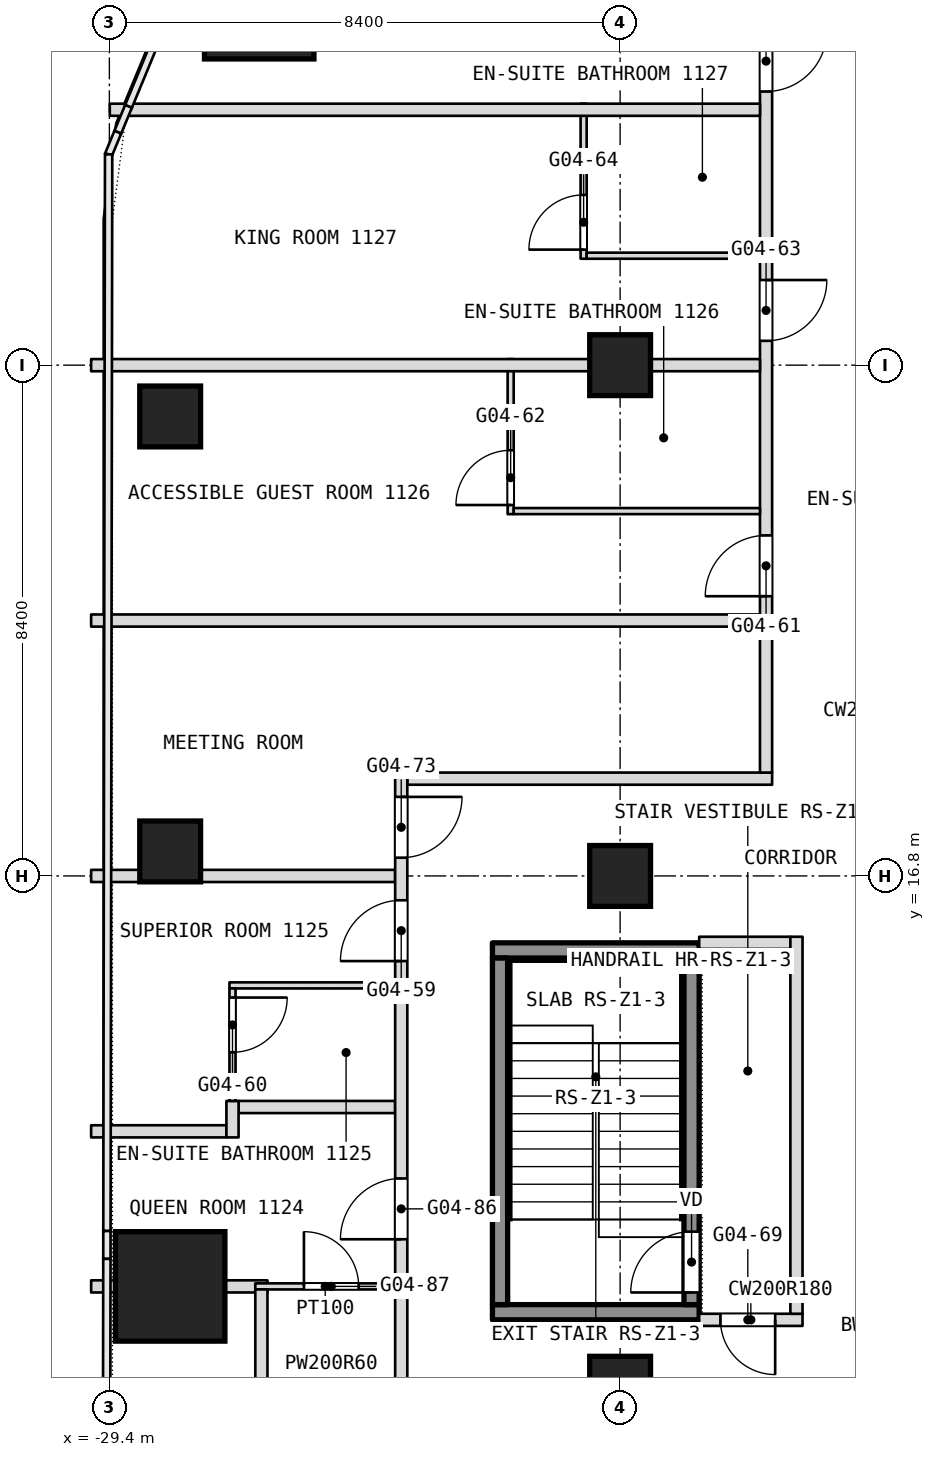
"""IFC4 building model, lengths in metres.
Left out: names, types, materials, properties, quantities, classifications, styles, units other than length and angle.
Written with IfcOpenShell. Run it as: python <this file> out.ifc"""

import sys

from ifc_helpers import new_model, si_unit, direction, frame, frame_2d, origin, origin_2d, place, context, subcontext, project, spatial, rectangle, extrude, element, fill, save


model = new_model("IFC4")
c1 = context("Model", 3, precision=1e-05, world=origin(), true_north=direction((0.0, 1.0)))
c2 = subcontext(c1, "Body", "Model", "MODEL_VIEW")
j1 = project(units=[si_unit("LENGTHUNIT", "METRE"), si_unit("PLANEANGLEUNIT", "RADIAN")], contexts=[c1])
p1 = place(None, origin())
s1 = spatial("IfcSite", under=j1, at=p1, CompositionType="ELEMENT")
p2 = place(p1, origin())
s2 = spatial("IfcBuilding", under=s1, at=p2, CompositionType="ELEMENT")
p3 = place(p2, frame((0.0, 0.0, 54.5)))
s3 = spatial("IfcBuildingStorey", under=s2, at=p3, CompositionType="ELEMENT", Elevation=54.5)
for number, where, z_axis, x_axis in (
    (1, (-26.936, 31.135, 0.0), (0.0, 0.0, 1.0), (1.0, 0.0, 0.0)),
    (2, (-28.4, 10.05, 0.0), (0.0, 0.0, 1.0), (1.0, 0.0, 0.0)),
):
    element("IfcColumn", number, at=place(p3, frame(where, z_axis=z_axis, x_axis=x_axis)), inside=s3, PredefinedType="COLUMN", context=c2, shape_type="SweptSolid", body=[
        extrude(rectangle(XDim=1.8, YDim=1.8, at=origin_2d()), origin(), (0.0, 0.0, 1.0), 3.6),
    ])
for number, where, z_axis, x_axis in (
    (3, (-21.0, 8.4, 0.0), (0.0, 0.0, 1.0), (1.0, 0.0, 0.0)),
    (4, (-21.0, 16.8, 0.0), (0.0, 0.0, 1.0), (1.0, 0.0, 0.0)),
    (5, (-21.0, 25.2, 0.0), (0.0, 0.0, 1.0), (1.0, 0.0, 0.0)),
    (6, (-28.4, 17.203, 0.0), (0.0, 0.0, 1.0), (1.0, 0.0, 0.0)),
    (7, (-28.4, 24.356, 0.0), (0.0, 0.0, 1.0), (1.0, 0.0, 0.0)),
):
    element("IfcColumn", number, at=place(p3, frame(where, z_axis=z_axis, x_axis=x_axis)), inside=s3, PredefinedType="COLUMN", context=c2, shape_type="SweptSolid", body=[
        extrude(rectangle(XDim=1.0, YDim=1.0, at=origin_2d()), origin(), (0.0, 0.0, 1.0), 3.6),
    ])
p4 = place(p3, frame((-19.7, 9.5, 0.0), z_axis=(0.0, 0.0, 1.0), x_axis=(1.0, 0.0, 0.0)))
e8 = element("IfcWall", 8, at=p4, inside=s3, PredefinedType="PARTITIONING", context=c2, shape_type="SweptSolid", body=[
    extrude(rectangle(XDim=1.7, YDim=0.2, at=frame_2d((0.85, 0.0))), origin(), (0.0, 0.0, 1.0), 3.34),
])
p5 = place(p4, frame((0.35, 0.0, 0.0)))
e9 = element("IfcOpeningElement", 9, at=p5, cuts=e8, PredefinedType="OPENING", context=c2, shape_type="SweptSolid", body=[
    extrude(rectangle(XDim=0.9, YDim=2.1, at=frame_2d((0.45, 1.05))), frame((0.0, 0.1, 0.0), z_axis=(0.0, -1.0, 0.0), x_axis=(1.0, 0.0, 0.0)), (0.0, 0.0, 1.0), 0.2),
])
p6 = place(p3, frame((-29.7, 10.05, 0.0), z_axis=(0.0, 0.0, 1.0), x_axis=(1.0, 0.0, 0.0)))
e10 = element("IfcWall", 10, at=p6, inside=s3, PredefinedType="PARTITIONING", context=c2, shape_type="SweptSolid", body=[
    extrude(rectangle(XDim=0.4, YDim=0.2, at=frame_2d((0.2, 0.0))), origin(), (0.0, 0.0, 1.0), 3.34),
])
p7 = place(p3, frame((-27.5, 10.05, 0.0), z_axis=(0.0, 0.0, 1.0), x_axis=(1.0, 0.0, 0.0)))
e11 = element("IfcWall", 11, at=p7, inside=s3, PredefinedType="PARTITIONING", context=c2, shape_type="SweptSolid", body=[
    extrude(rectangle(XDim=0.7, YDim=0.2, at=frame_2d((0.35, 0.0))), origin(), (0.0, 0.0, 1.0), 3.34),
])
p8 = place(p3, frame((-27.0, 10.05, 0.0), z_axis=(0.0, 0.0, 1.0), x_axis=(1.0, 0.0, 0.0)))
e12 = element("IfcWall", 12, at=p8, inside=s3, PredefinedType="PARTITIONING", context=c2, shape_type="SweptSolid", body=[
    extrude(rectangle(XDim=2.3, YDim=0.1, at=frame_2d((1.15, 0.0))), origin(), (0.0, 0.0, 1.0), 3.34),
])
p9 = place(p8, frame((0.8, 0.0, 0.0)))
e13 = element("IfcOpeningElement", 13, at=p9, cuts=e12, PredefinedType="OPENING", context=c2, shape_type="SweptSolid", body=[
    extrude(rectangle(XDim=0.9, YDim=2.1, at=frame_2d((0.45, 1.05))), frame((0.0, 0.05, 0.0), z_axis=(0.0, -1.0, 0.0), x_axis=(1.0, 0.0, 0.0)), (0.0, 0.0, 1.0), 0.1),
])
p10 = place(p3, frame((-29.7, 12.6, 0.0), z_axis=(0.0, 0.0, 1.0), x_axis=(1.0, 0.0, 0.0)))
e14 = element("IfcWall", 14, at=p10, inside=s3, PredefinedType="PARTITIONING", context=c2, shape_type="SweptSolid", body=[
    extrude(rectangle(XDim=2.225, YDim=0.2, at=frame_2d((1.112, 0.0))), origin(), (0.0, 0.0, 1.0), 3.34),
])
p11 = place(p3, frame((-27.275, 13.0, 0.0), z_axis=(0.0, 0.0, 1.0), x_axis=(1.0, 0.0, 0.0)))
e15 = element("IfcWall", 15, at=p11, inside=s3, PredefinedType="PARTITIONING", context=c2, shape_type="SweptSolid", body=[
    extrude(rectangle(XDim=2.575, YDim=0.2, at=frame_2d((1.288, 0.0))), origin(), (0.0, 0.0, 1.0), 3.34),
])
p12 = place(p3, frame((-27.425, 15.0, 0.0), z_axis=(0.0, 0.0, 1.0), x_axis=(1.0, 0.0, 0.0)))
e16 = element("IfcWall", 16, at=p12, inside=s3, PredefinedType="PARTITIONING", context=c2, shape_type="SweptSolid", body=[
    extrude(rectangle(XDim=2.725, YDim=0.1, at=frame_2d((1.363, 0.0))), origin(), (0.0, 0.0, 1.0), 3.34),
])
p13 = place(p3, frame((-19.7, 15.7, 0.0), z_axis=(0.0, 0.0, 1.0), x_axis=(1.0, 0.0, 0.0)))
e17 = element("IfcWall", 17, at=p13, inside=s3, PredefinedType="PARTITIONING", context=c2, shape_type="SweptSolid", body=[
    extrude(rectangle(XDim=1.5, YDim=0.2, at=frame_2d((0.75, 0.0))), origin(), (0.0, 0.0, 1.0), 3.34),
])
p14 = place(p3, frame((-29.7, 16.8, 0.0), z_axis=(0.0, 0.0, 1.0), x_axis=(1.0, 0.0, 0.0)))
e18 = element("IfcWall", 18, at=p14, inside=s3, PredefinedType="PARTITIONING", context=c2, shape_type="SweptSolid", body=[
    extrude(rectangle(XDim=5.0, YDim=0.2, at=frame_2d((2.5, 0.0))), origin(), (0.0, 0.0, 1.0), 2.84),
])
p15 = place(p3, frame((-18.1, 9.6, 0.0), z_axis=(0.0, 0.0, 1.0), x_axis=(0.0, 1.0, 0.0)))
e19 = element("IfcWall", 19, at=p15, inside=s3, PredefinedType="PARTITIONING", context=c2, shape_type="SweptSolid", body=[
    extrude(rectangle(XDim=6.2, YDim=0.2, at=frame_2d((3.1, 0.0))), origin(), (0.0, 0.0, 1.0), 3.34),
])
p16 = place(p3, frame((-24.5, 18.4, 0.0), z_axis=(0.0, 0.0, 1.0), x_axis=(1.0, 0.0, 0.0)))
e20 = element("IfcWall", 20, at=p16, inside=s3, PredefinedType="PARTITIONING", context=c2, shape_type="SweptSolid", body=[
    extrude(rectangle(XDim=6.0, YDim=0.2, at=frame_2d((3.0, 0.0))), origin(), (0.0, 0.0, 1.0), 3.34),
])
p17 = place(p3, frame((-18.6, 18.5, 0.0), z_axis=(0.0, 0.0, 1.0), x_axis=(0.0, 1.0, 0.0)))
e21 = element("IfcWall", 21, at=p17, inside=s3, PredefinedType="PARTITIONING", context=c2, shape_type="SweptSolid", body=[
    extrude(rectangle(XDim=15.04, YDim=0.2, at=frame_2d((7.52, 0.0))), origin(), (0.0, 0.0, 1.0), 3.34),
])
p18 = place(p17, frame((2.9, 0.0, 0.0)))
e22 = element("IfcOpeningElement", 22, at=p18, cuts=e21, PredefinedType="OPENING", context=c2, shape_type="SweptSolid", body=[
    extrude(rectangle(XDim=1.0, YDim=2.1, at=frame_2d((0.5, 1.05))), frame((0.0, 0.1, 0.0), z_axis=(0.0, -1.0, 0.0), x_axis=(1.0, 0.0, 0.0)), (0.0, 0.0, 1.0), 0.2),
])
p19 = place(p17, frame((7.1, 0.0, 0.0)))
e23 = element("IfcOpeningElement", 23, at=p19, cuts=e21, PredefinedType="OPENING", context=c2, shape_type="SweptSolid", body=[
    extrude(rectangle(XDim=1.0, YDim=2.1, at=frame_2d((0.5, 1.05))), frame((0.0, 0.1, 0.0), z_axis=(0.0, -1.0, 0.0), x_axis=(1.0, 0.0, 0.0)), (0.0, 0.0, 1.0), 0.2),
])
p20 = place(p17, frame((11.2, 0.0, 0.0)))
e24 = element("IfcOpeningElement", 24, at=p20, cuts=e21, PredefinedType="OPENING", context=c2, shape_type="SweptSolid", body=[
    extrude(rectangle(XDim=1.0, YDim=2.1, at=frame_2d((0.5, 1.05))), frame((0.0, 0.1, 0.0), z_axis=(0.0, -1.0, 0.0), x_axis=(1.0, 0.0, 0.0)), (0.0, 0.0, 1.0), 0.2),
])
p21 = place(p3, frame((-29.7, 21.0, 0.0), z_axis=(0.0, 0.0, 1.0), x_axis=(1.0, 0.0, 0.0)))
e25 = element("IfcWall", 25, at=p21, inside=s3, PredefinedType="PARTITIONING", context=c2, shape_type="SweptSolid", body=[
    extrude(rectangle(XDim=11.0, YDim=0.2, at=frame_2d((5.5, 0.0))), origin(), (0.0, 0.0, 1.0), 3.34),
])
p22 = place(p3, frame((-21.6, 26.95, 0.0), z_axis=(0.0, 0.0, 1.0), x_axis=(0.0, 1.0, 0.0)))
e26 = element("IfcWall", 26, at=p22, inside=s3, PredefinedType="PARTITIONING", context=c2, shape_type="SweptSolid", body=[
    extrude(rectangle(XDim=2.55, YDim=0.1, at=frame_2d((1.275, 0.0))), origin(), (0.0, 0.0, 1.0), 3.34),
])
p23 = place(p22, frame((0.15, 0.0, 0.0)))
e27 = element("IfcOpeningElement", 27, at=p23, cuts=e26, PredefinedType="OPENING", context=c2, shape_type="SweptSolid", body=[
    extrude(rectangle(XDim=0.9, YDim=2.1, at=frame_2d((0.45, 1.05))), frame((0.0, 0.05, 0.0), z_axis=(0.0, -1.0, 0.0), x_axis=(1.0, 0.0, 0.0)), (0.0, 0.0, 1.0), 0.1),
])
p24 = place(p3, frame((-22.8, 22.75, 0.0), z_axis=(0.0, 0.0, 1.0), x_axis=(0.0, 1.0, 0.0)))
e28 = element("IfcWall", 28, at=p24, inside=s3, PredefinedType="PARTITIONING", context=c2, shape_type="SweptSolid", body=[
    extrude(rectangle(XDim=2.55, YDim=0.1, at=frame_2d((1.275, 0.0))), origin(), (0.0, 0.0, 1.0), 3.34),
])
p25 = place(p24, frame((0.15, 0.0, 0.0)))
e29 = element("IfcOpeningElement", 29, at=p25, cuts=e28, PredefinedType="OPENING", context=c2, shape_type="SweptSolid", body=[
    extrude(rectangle(XDim=0.9, YDim=2.1, at=frame_2d((0.45, 1.05))), frame((0.0, 0.05, 0.0), z_axis=(0.0, -1.0, 0.0), x_axis=(1.0, 0.0, 0.0)), (0.0, 0.0, 1.0), 0.1),
])
p26 = place(p3, frame((-22.75, 22.8, 0.0), z_axis=(0.0, 0.0, 1.0), x_axis=(1.0, 0.0, 0.0)))
e30 = element("IfcWall", 30, at=p26, inside=s3, PredefinedType="PARTITIONING", context=c2, shape_type="SweptSolid", body=[
    extrude(rectangle(XDim=4.05, YDim=0.1, at=frame_2d((2.025, 0.0))), origin(), (0.0, 0.0, 1.0), 3.34),
])
p27 = place(p3, frame((-24.6, 6.9, 0.0), z_axis=(0.0, 0.0, 1.0), x_axis=(0.0, 1.0, 0.0)))
e31 = element("IfcWall", 31, at=p27, inside=s3, PredefinedType="PARTITIONING", context=c2, shape_type="SweptSolid", body=[
    extrude(rectangle(XDim=11.6, YDim=0.2, at=frame_2d((5.8, 0.0))), origin(), (0.0, 0.0, 1.0), 3.34),
])
p28 = place(p27, frame((8.5, 0.0, 0.0)))
e32 = element("IfcOpeningElement", 32, at=p28, cuts=e31, PredefinedType="OPENING", context=c2, shape_type="SweptSolid", body=[
    extrude(rectangle(XDim=1.0, YDim=2.1, at=frame_2d((0.5, 1.05))), frame((0.0, 0.1, 0.0), z_axis=(0.0, -1.0, 0.0), x_axis=(1.0, 0.0, 0.0)), (0.0, 0.0, 1.0), 0.2),
])
p29 = place(p27, frame((10.2, 0.0, 0.0)))
e33 = element("IfcOpeningElement", 33, at=p29, cuts=e31, PredefinedType="OPENING", context=c2, shape_type="SweptSolid", body=[
    extrude(rectangle(XDim=1.0, YDim=2.1, at=frame_2d((0.5, 1.05))), frame((0.0, 0.1, 0.0), z_axis=(0.0, -1.0, 0.0), x_axis=(1.0, 0.0, 0.0)), (0.0, 0.0, 1.0), 0.2),
])
p30 = place(p27, frame((0.3, 0.0, 0.0)))
e34 = element("IfcOpeningElement", 34, at=p30, cuts=e31, PredefinedType="OPENING", context=c2, shape_type="SweptSolid", body=[
    extrude(rectangle(XDim=1.0, YDim=2.1, at=frame_2d((0.5, 1.05))), frame((0.0, 0.1, 0.0), z_axis=(0.0, -1.0, 0.0), x_axis=(1.0, 0.0, 0.0)), (0.0, 0.0, 1.0), 0.2),
])
p31 = place(p27, frame((3.925, 0.0, 0.0)))
e35 = element("IfcOpeningElement", 35, at=p31, cuts=e31, PredefinedType="OPENING", context=c2, shape_type="SweptSolid", body=[
    extrude(rectangle(XDim=1.0, YDim=2.1, at=frame_2d((0.5, 1.05))), frame((0.0, 0.1, 0.0), z_axis=(0.0, -1.0, 0.0), x_axis=(1.0, 0.0, 0.0)), (0.0, 0.0, 1.0), 0.2),
])
p32 = place(p3, frame((-29.7, 25.2, 0.0), z_axis=(0.0, 0.0, 1.0), x_axis=(1.0, 0.0, 0.0)))
e36 = element("IfcWall", 36, at=p32, inside=s3, PredefinedType="PARTITIONING", context=c2, shape_type="SweptSolid", body=[
    extrude(rectangle(XDim=11.0, YDim=0.2, at=frame_2d((5.5, 0.0))), origin(), (0.0, 0.0, 1.0), 2.84),
])
p33 = place(p3, frame((-26.9, 8.3, 0.0), z_axis=(0.0, 0.0, 1.0), x_axis=(0.0, 1.0, 0.0)))
e37 = element("IfcWall", 37, at=p33, inside=s3, PredefinedType="PARTITIONING", context=c2, shape_type="SweptSolid", body=[
    extrude(rectangle(XDim=1.7, YDim=0.2, at=frame_2d((0.85, 0.0))), origin(), (0.0, 0.0, 1.0), 3.34),
])
p34 = place(p3, frame((-21.55, 27.0, 0.0), z_axis=(0.0, 0.0, 1.0), x_axis=(1.0, 0.0, 0.0)))
e38 = element("IfcWall", 38, at=p34, inside=s3, PredefinedType="PARTITIONING", context=c2, shape_type="SweptSolid", body=[
    extrude(rectangle(XDim=2.85, YDim=0.1, at=frame_2d((1.425, 0.0))), origin(), (0.0, 0.0, 1.0), 3.34),
])
p35 = place(p3, frame((-27.375, 12.5, 0.0), z_axis=(0.0, 0.0, 1.0), x_axis=(0.0, 1.0, 0.0)))
e39 = element("IfcWall", 39, at=p35, inside=s3, PredefinedType="PARTITIONING", context=c2, shape_type="SweptSolid", body=[
    extrude(rectangle(XDim=0.6, YDim=0.2, at=frame_2d((0.3, 0.0))), origin(), (0.0, 0.0, 1.0), 3.34),
])
p36 = place(p3, frame((-27.375, 13.1, 0.0), z_axis=(0.0, 0.0, 1.0), x_axis=(0.0, 1.0, 0.0)))
e40 = element("IfcWall", 40, at=p36, inside=s3, PredefinedType="PARTITIONING", context=c2, shape_type="SweptSolid", body=[
    extrude(rectangle(XDim=1.85, YDim=0.1, at=frame_2d((0.925, 0.0))), origin(), (0.0, 0.0, 1.0), 3.34),
])
p37 = place(p36, frame((0.8, 0.0, 0.0)))
e41 = element("IfcOpeningElement", 41, at=p37, cuts=e40, PredefinedType="OPENING", context=c2, shape_type="SweptSolid", body=[
    extrude(rectangle(XDim=0.9, YDim=2.1, at=frame_2d((0.45, 1.05))), frame((0.0, 0.05, 0.0), z_axis=(0.0, -1.0, 0.0), x_axis=(1.0, 0.0, 0.0)), (0.0, 0.0, 1.0), 0.1),
])
p38 = place(p3, frame((-29.393, 29.4, 0.0), z_axis=(0.0, 0.0, 1.0), x_axis=(1.0, 0.0, 0.0)))
e42 = element("IfcWall", 42, at=p38, inside=s3, PredefinedType="PARTITIONING", context=c2, shape_type="SweptSolid", body=[
    extrude(rectangle(XDim=10.693, YDim=0.2, at=frame_2d((5.347, 0.0))), origin(), (0.0, 0.0, 1.0), 3.34),
])
for number, where, z_axis, x_axis in (
    (43, (-23.1, 9.625, 0.1), (0.0, 0.0, 1.0), (1.0, 0.0, 0.0)),
    (44, (-23.1, 15.575, 0.1), (0.0, 0.0, 1.0), (1.0, 0.0, 0.0)),
):
    element("IfcWall", number, at=place(p3, frame(where, z_axis=z_axis, x_axis=x_axis)), inside=s3, PredefinedType="SHEAR", context=c2, shape_type="SweptSolid", body=[
        extrude(rectangle(XDim=3.4, YDim=0.25, at=frame_2d((1.7, 0.0))), origin(), (0.0, 0.0, 1.0), 3.6),
    ])
p39 = place(p3, frame((-22.975, 9.75, 0.1), z_axis=(0.0, 0.0, 1.0), x_axis=(0.0, 1.0, 0.0)))
e45 = element("IfcWall", 45, at=p39, inside=s3, PredefinedType="SHEAR", context=c2, shape_type="SweptSolid", body=[
    extrude(rectangle(XDim=5.7, YDim=0.25, at=frame_2d((2.85, 0.0))), origin(), (0.0, 0.0, 1.0), 3.6),
])
p40 = place(p3, frame((-19.825, 9.75, 0.1), z_axis=(0.0, 0.0, 1.0), x_axis=(0.0, 1.0, 0.0)))
e46 = element("IfcWall", 46, at=p40, inside=s3, PredefinedType="SHEAR", context=c2, shape_type="SweptSolid", body=[
    extrude(rectangle(XDim=5.7, YDim=0.25, at=frame_2d((2.85, 0.0))), origin(), (0.0, 0.0, 1.0), 3.6),
])
p41 = place(p40, frame((0.2, 0.0, 0.0)))
e47 = element("IfcOpeningElement", 47, at=p41, cuts=e46, PredefinedType="OPENING", context=c2, shape_type="SweptSolid", body=[
    extrude(rectangle(XDim=1.0, YDim=2.1, at=frame_2d((0.5, 1.05))), frame((0.0, 0.125, 0.0), z_axis=(0.0, -1.0, 0.0), x_axis=(1.0, 0.0, 0.0)), (0.0, 0.0, 1.0), 0.25),
])
p42 = place(p5, origin())
e48 = element("IfcDoor", 48, at=p42, inside=s3, OperationType="SINGLE_SWING_RIGHT", PredefinedType="DOOR", context=c2, shape_type="SweptSolid", body=[
    extrude(rectangle(XDim=0.9, YDim=2.1, at=frame_2d((0.45, 1.05))), frame((0.0, 0.025, 0.0), z_axis=(0.0, -1.0, 0.0), x_axis=(1.0, 0.0, 0.0)), (0.0, 0.0, 1.0), 0.05),
])
fill(e9, e48)
p43 = place(p9, origin())
e49 = element("IfcDoor", 49, at=p43, inside=s3, OperationType="SINGLE_SWING_LEFT", PredefinedType="DOOR", context=c2, shape_type="SweptSolid", body=[
    extrude(rectangle(XDim=0.9, YDim=2.1, at=frame_2d((0.45, 1.05))), frame((0.0, 0.025, 0.0), z_axis=(0.0, -1.0, 0.0), x_axis=(1.0, 0.0, 0.0)), (0.0, 0.0, 1.0), 0.05),
])
fill(e13, e49)
p44 = place(p18, origin())
e50 = element("IfcDoor", 50, at=p44, inside=s3, OperationType="SINGLE_SWING_RIGHT", PredefinedType="DOOR", context=c2, shape_type="SweptSolid", body=[
    extrude(rectangle(XDim=1.0, YDim=2.1, at=frame_2d((0.5, 1.05))), frame((0.0, 0.025, 0.0), z_axis=(0.0, -1.0, 0.0), x_axis=(1.0, 0.0, 0.0)), (0.0, 0.0, 1.0), 0.05),
])
fill(e22, e50)
p45 = place(p19, origin())
e51 = element("IfcDoor", 51, at=p45, inside=s3, OperationType="SINGLE_SWING_RIGHT", PredefinedType="DOOR", context=c2, shape_type="SweptSolid", body=[
    extrude(rectangle(XDim=1.0, YDim=2.1, at=frame_2d((0.5, 1.05))), frame((0.0, 0.025, 0.0), z_axis=(0.0, -1.0, 0.0), x_axis=(1.0, 0.0, 0.0)), (0.0, 0.0, 1.0), 0.05),
])
fill(e23, e51)
p46 = place(p20, origin())
e52 = element("IfcDoor", 52, at=p46, inside=s3, OperationType="SINGLE_SWING_RIGHT", PredefinedType="DOOR", context=c2, shape_type="SweptSolid", body=[
    extrude(rectangle(XDim=1.0, YDim=2.1, at=frame_2d((0.5, 1.05))), frame((0.0, 0.025, 0.0), z_axis=(0.0, -1.0, 0.0), x_axis=(1.0, 0.0, 0.0)), (0.0, 0.0, 1.0), 0.05),
])
fill(e24, e52)
p47 = place(p23, origin())
e53 = element("IfcDoor", 53, at=p47, inside=s3, OperationType="SINGLE_SWING_RIGHT", PredefinedType="DOOR", context=c2, shape_type="SweptSolid", body=[
    extrude(rectangle(XDim=0.9, YDim=2.1, at=frame_2d((0.45, 1.05))), frame((0.0, 0.025, 0.0), z_axis=(0.0, -1.0, 0.0), x_axis=(1.0, 0.0, 0.0)), (0.0, 0.0, 1.0), 0.05),
])
fill(e27, e53)
p48 = place(p25, origin())
e54 = element("IfcDoor", 54, at=p48, inside=s3, OperationType="SINGLE_SWING_RIGHT", PredefinedType="DOOR", context=c2, shape_type="SweptSolid", body=[
    extrude(rectangle(XDim=0.9, YDim=2.1, at=frame_2d((0.45, 1.05))), frame((0.0, 0.025, 0.0), z_axis=(0.0, -1.0, 0.0), x_axis=(1.0, 0.0, 0.0)), (0.0, 0.0, 1.0), 0.05),
])
fill(e29, e54)
p49 = place(p28, origin())
e55 = element("IfcDoor", 55, at=p49, inside=s3, OperationType="SINGLE_SWING_RIGHT", PredefinedType="DOOR", context=c2, shape_type="SweptSolid", body=[
    extrude(rectangle(XDim=1.0, YDim=2.1, at=frame_2d((0.5, 1.05))), frame((0.0, 0.025, 0.0), z_axis=(0.0, -1.0, 0.0), x_axis=(1.0, 0.0, 0.0)), (0.0, 0.0, 1.0), 0.05),
])
fill(e32, e55)
p50 = place(p29, origin())
e56 = element("IfcDoor", 56, at=p50, inside=s3, OperationType="SINGLE_SWING_LEFT", PredefinedType="DOOR", context=c2, shape_type="SweptSolid", body=[
    extrude(rectangle(XDim=1.0, YDim=2.1, at=frame_2d((0.5, 1.05))), frame((0.0, 0.025, 0.0), z_axis=(0.0, -1.0, 0.0), x_axis=(1.0, 0.0, 0.0)), (0.0, 0.0, 1.0), 0.05),
])
fill(e33, e56)
p51 = place(p31, origin())
e57 = element("IfcDoor", 57, at=p51, inside=s3, OperationType="SINGLE_SWING_LEFT", PredefinedType="DOOR", context=c2, shape_type="SweptSolid", body=[
    extrude(rectangle(XDim=1.0, YDim=2.1, at=frame_2d((0.5, 1.05))), frame((0.0, 0.025, 0.0), z_axis=(0.0, -1.0, 0.0), x_axis=(1.0, 0.0, 0.0)), (0.0, 0.0, 1.0), 0.05),
])
fill(e35, e57)
p52 = place(p37, origin())
e58 = element("IfcDoor", 58, at=p52, inside=s3, OperationType="SINGLE_SWING_LEFT", PredefinedType="DOOR", context=c2, shape_type="SweptSolid", body=[
    extrude(rectangle(XDim=0.9, YDim=2.1, at=frame_2d((0.45, 1.05))), frame((0.0, 0.025, 0.0), z_axis=(0.0, -1.0, 0.0), x_axis=(1.0, 0.0, 0.0)), (0.0, 0.0, 1.0), 0.05),
])
fill(e41, e58)
p53 = place(p41, origin())
e59 = element("IfcDoor", 59, at=p53, inside=s3, OperationType="SINGLE_SWING_LEFT", PredefinedType="DOOR", context=c2, shape_type="SweptSolid", body=[
    extrude(rectangle(XDim=1.0, YDim=2.1, at=frame_2d((0.5, 1.05))), frame((0.0, 0.025, 0.0), z_axis=(0.0, -1.0, 0.0), x_axis=(1.0, 0.0, 0.0)), (0.0, 0.0, 1.0), 0.05),
])
fill(e47, e59)
save(model, sys.argv[1])
